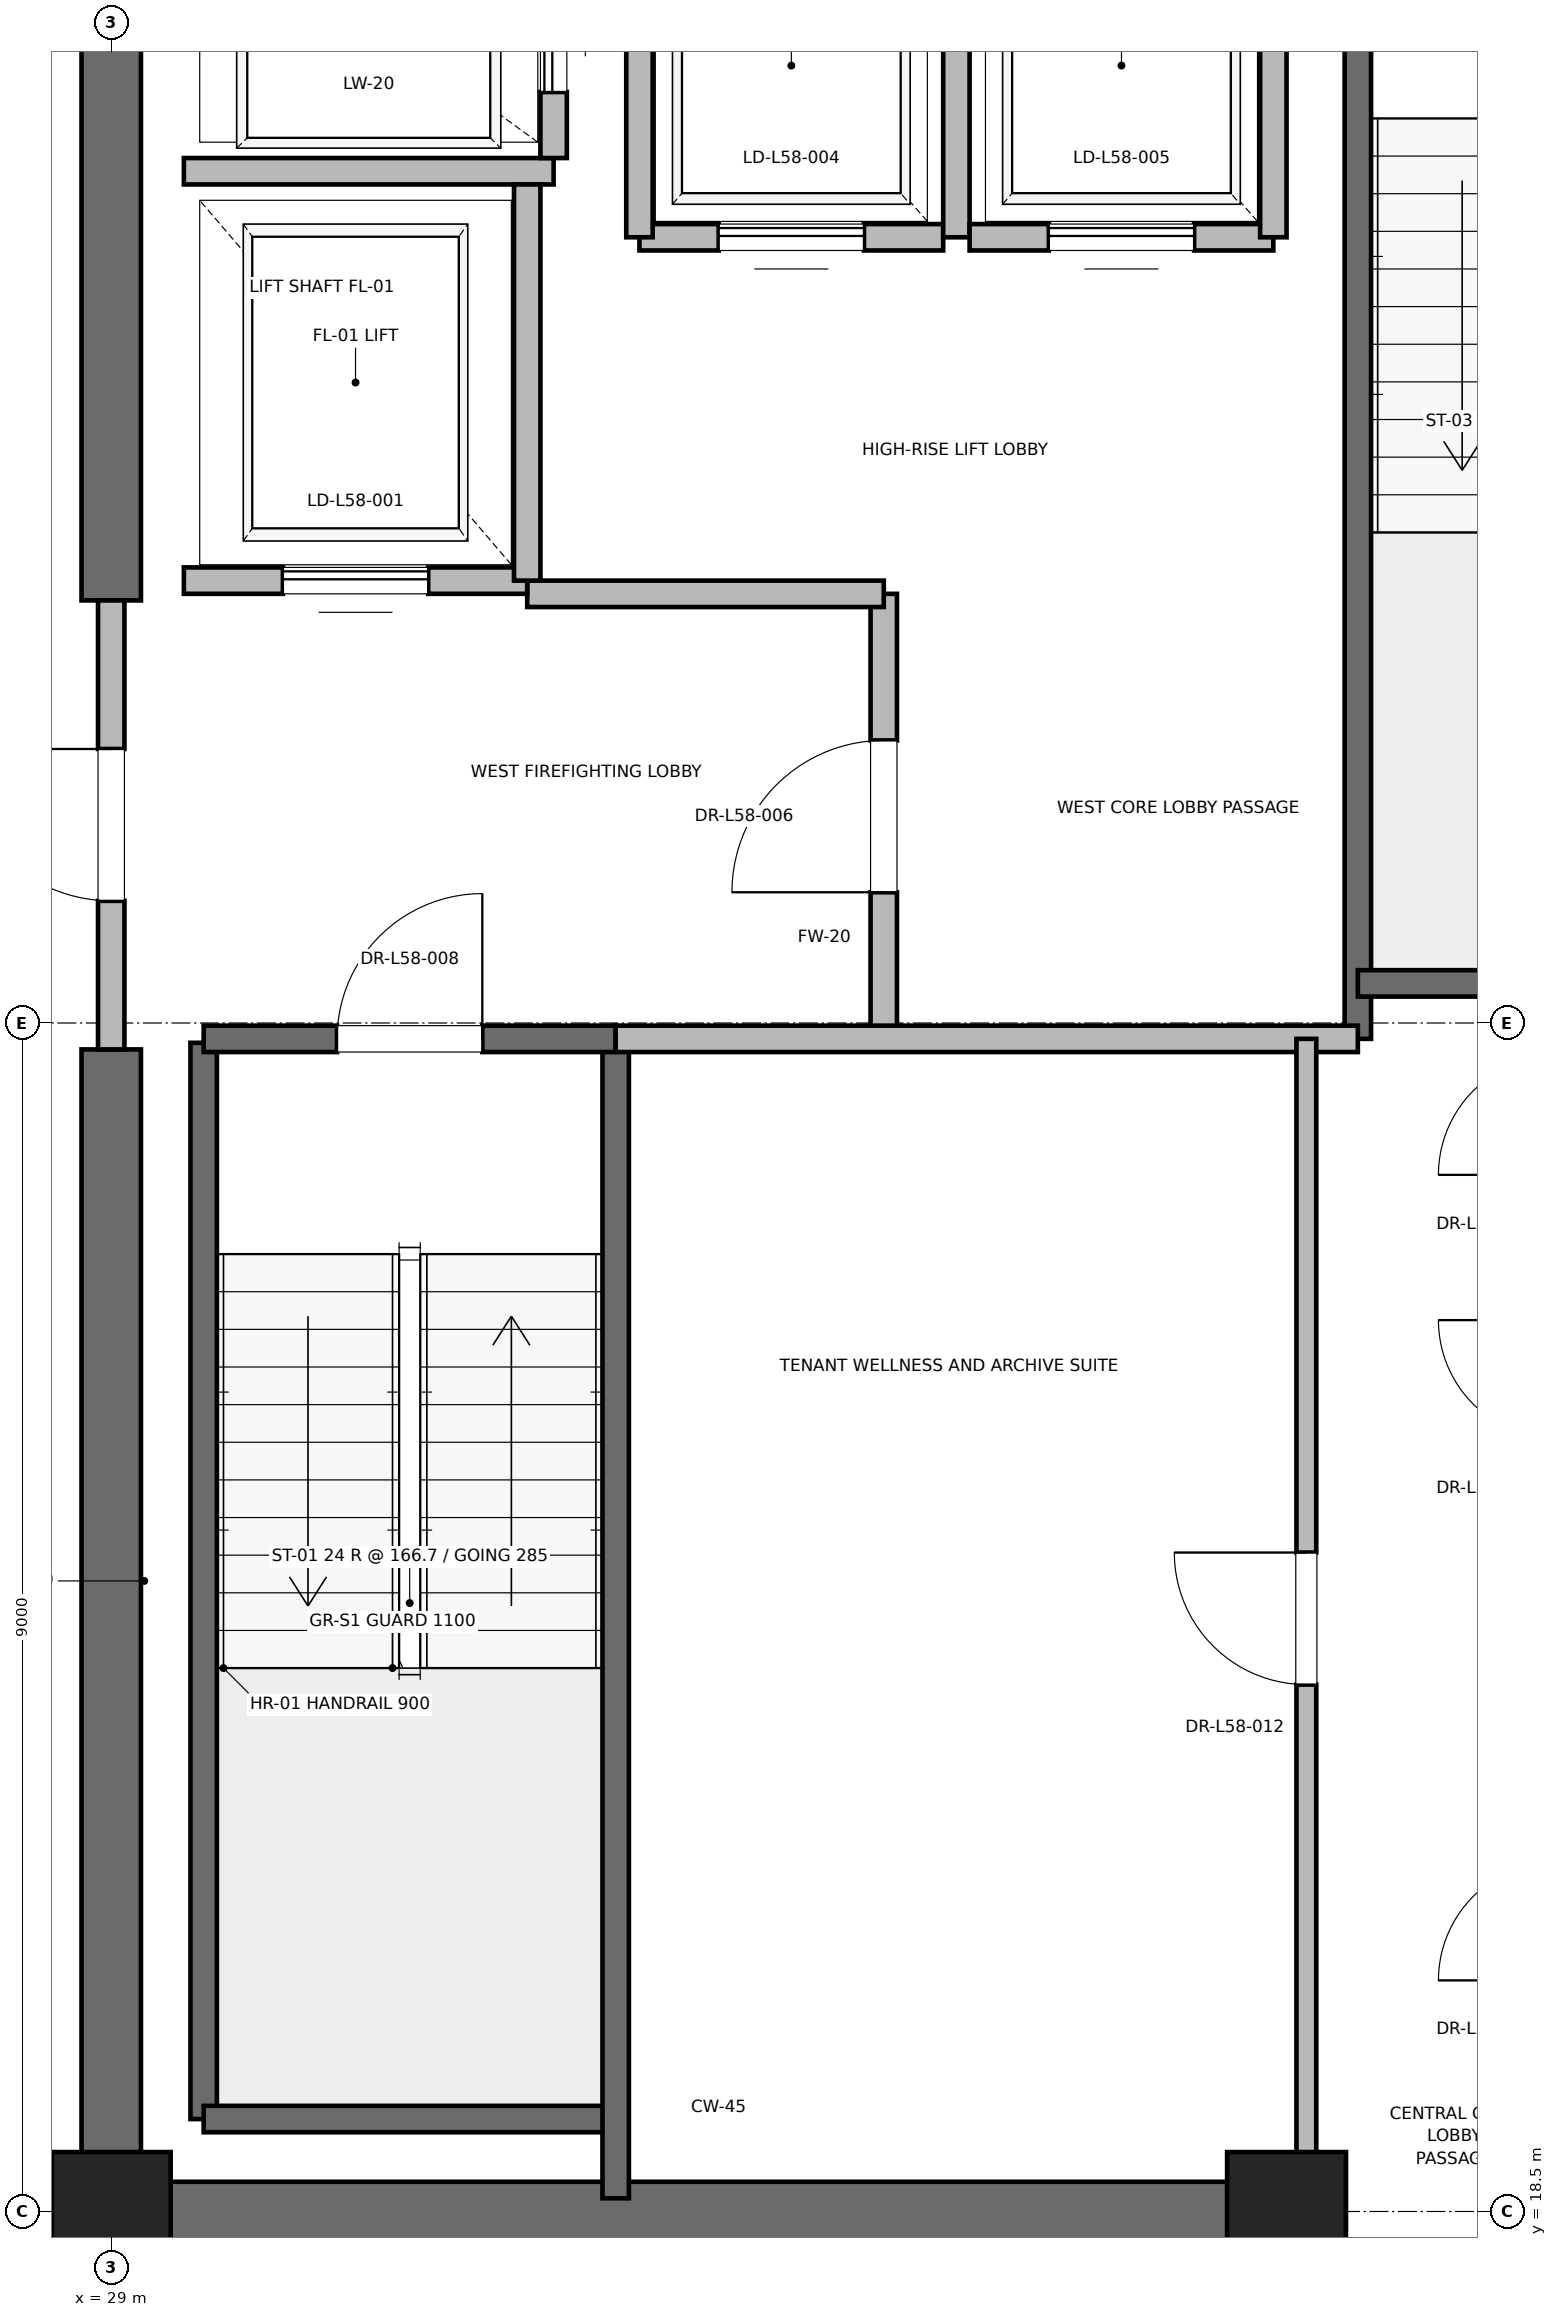
"""IFC4 building model, lengths in metres.
Left out: names, types, materials, properties, quantities, classifications, styles, units other than length and angle.
Written with IfcOpenShell. Run it as: python <this file> out.ifc"""

import sys

from ifc_helpers import new_model, si_unit, direction, frame, frame_2d, origin, origin_2d, place, context, subcontext, project, spatial, rectangle, extrude, element, fill, save


model = new_model("IFC4")
c1 = context("Model", 3, precision=1e-05, world=origin(), true_north=direction((0.0, 1.0)))
c2 = subcontext(c1, "Body", "Model", "MODEL_VIEW")
j1 = project(units=[si_unit("LENGTHUNIT", "METRE"), si_unit("PLANEANGLEUNIT", "RADIAN")], contexts=[c1])
p1 = place(None, origin())
s1 = spatial("IfcSite", under=j1, at=p1, CompositionType="ELEMENT")
p2 = place(p1, origin())
s2 = spatial("IfcBuilding", under=s1, at=p2, CompositionType="ELEMENT")
p3 = place(p2, frame((0.0, 0.0, 251.2)))
s3 = spatial("IfcBuildingStorey", under=s2, at=p3, CompositionType="ELEMENT", Elevation=251.2)
for number, where, z_axis, x_axis in (
    (1, (29.0, 18.5, 0.0), (0.0, 0.0, 1.0), (1.0, 0.0, 0.0)),
    (2, (37.9, 18.5, 0.0), (0.0, 0.0, 1.0), (1.0, 0.0, 0.0)),
):
    element("IfcColumn", number, at=place(p3, frame(where, z_axis=z_axis, x_axis=x_axis)), inside=s3, PredefinedType="PILASTER", context=c2, shape_type="SweptSolid", body=[
        extrude(rectangle(XDim=0.9, YDim=0.9, at=origin_2d()), origin(), (0.0, 0.0, 1.0), 4.0),
    ])
p4 = place(p3, frame((29.0, 18.5, 0.0), z_axis=(0.0, 0.0, 1.0), x_axis=(1.0, 0.0, 0.0)))
e3 = element("IfcWall", 3, at=p4, inside=s3, PredefinedType="SHEAR", context=c2, shape_type="SweptSolid", body=[
    extrude(rectangle(XDim=9.2, YDim=0.45, at=frame_2d((4.6, 0.0))), origin(), (0.0, 0.0, 1.0), 3.785),
])
p5 = place(p3, frame((29.0, 18.5, 0.0), z_axis=(0.0, 0.0, 1.0), x_axis=(0.0, 1.0, 0.0)))
e4 = element("IfcWall", 4, at=p5, inside=s3, PredefinedType="SHEAR", context=c2, shape_type="SweptSolid", body=[
    extrude(rectangle(XDim=8.8, YDim=0.45, at=frame_2d((4.4, 0.0))), origin(), (0.0, 0.0, 1.0), 3.785),
])
p6 = place(p3, frame((29.0, 30.7, 0.0), z_axis=(0.0, 0.0, 1.0), x_axis=(0.0, 1.0, 0.0)))
e5 = element("IfcWall", 5, at=p6, inside=s3, PredefinedType="SHEAR", context=c2, shape_type="SweptSolid", body=[
    extrude(rectangle(XDim=5.8, YDim=0.45, at=frame_2d((2.9, 0.0))), origin(), (0.0, 0.0, 1.0), 3.785),
])
p7 = place(p3, frame((29.7, 19.2, 0.0), z_axis=(0.0, 0.0, 1.0), x_axis=(0.0, 1.0, 0.0)))
e6 = element("IfcWall", 6, at=p7, inside=s3, PredefinedType="SOLIDWALL", context=c2, shape_type="SweptSolid", body=[
    extrude(rectangle(XDim=8.15, YDim=0.2, at=frame_2d((4.075, 0.0))), origin(), (0.0, 0.0, 1.0), 3.785),
])
p8 = place(p3, frame((29.7, 19.2, 0.0), z_axis=(0.0, 0.0, 1.0), x_axis=(1.0, 0.0, 0.0)))
e7 = element("IfcWall", 7, at=p8, inside=s3, PredefinedType="SOLIDWALL", context=c2, shape_type="SweptSolid", body=[
    extrude(rectangle(XDim=3.12, YDim=0.2, at=frame_2d((1.56, 0.0))), origin(), (0.0, 0.0, 1.0), 3.785),
])
p9 = place(p3, frame((32.82, 18.6, 0.0), z_axis=(0.0, 0.0, 1.0), x_axis=(0.0, 1.0, 0.0)))
e8 = element("IfcWall", 8, at=p9, inside=s3, PredefinedType="SOLIDWALL", context=c2, shape_type="SweptSolid", body=[
    extrude(rectangle(XDim=8.78, YDim=0.2, at=frame_2d((4.39, 0.0))), origin(), (0.0, 0.0, 1.0), 3.785),
])
p10 = place(p3, frame((29.7, 27.38, 0.0), z_axis=(0.0, 0.0, 1.0), x_axis=(1.0, 0.0, 0.0)))
e9 = element("IfcWall", 9, at=p10, inside=s3, PredefinedType="SOLIDWALL", context=c2, shape_type="SweptSolid", body=[
    extrude(rectangle(XDim=3.12, YDim=0.2, at=frame_2d((1.56, 0.0))), origin(), (0.0, 0.0, 1.0), 3.785),
])
p11 = place(p10, frame((1.01, 0.0, 0.0)))
e10 = element("IfcOpeningElement", 10, at=p11, cuts=e9, PredefinedType="OPENING", context=c2, shape_type="SweptSolid", body=[
    extrude(rectangle(XDim=1.1, YDim=2.15, at=frame_2d((0.55, 1.075))), frame((0.0, 0.1, 0.0), z_axis=(0.0, -1.0, 0.0), x_axis=(1.0, 0.0, 0.0)), (0.0, 0.0, 1.0), 0.2),
])
p12 = place(p3, frame((38.44, 27.38, 0.0), z_axis=(0.0, 0.0, 1.0), x_axis=(0.0, 1.0, 0.0)))
e11 = element("IfcWall", 11, at=p12, inside=s3, PredefinedType="SOLIDWALL", context=c2, shape_type="SweptSolid", body=[
    extrude(rectangle(XDim=8.87, YDim=0.2, at=frame_2d((4.435, 0.0))), origin(), (0.0, 0.0, 1.0), 3.785),
])
p13 = place(p3, frame((38.44, 27.8, 0.0), z_axis=(0.0, 0.0, 1.0), x_axis=(1.0, 0.0, 0.0)))
e12 = element("IfcWall", 12, at=p13, inside=s3, PredefinedType="SOLIDWALL", context=c2, shape_type="SweptSolid", body=[
    extrude(rectangle(XDim=3.32, YDim=0.2, at=frame_2d((1.66, 0.0))), origin(), (0.0, 0.0, 1.0), 3.785),
])
p14 = place(p3, frame((34.85, 27.38, 0.0), z_axis=(0.0, 0.0, 1.0), x_axis=(0.0, 1.0, 0.0)))
e13 = element("IfcWall", 13, at=p14, inside=s3, PredefinedType="PARTITIONING", context=c2, shape_type="SweptSolid", body=[
    extrude(rectangle(XDim=3.37, YDim=0.2, at=frame_2d((1.685, 0.0))), origin(), (0.0, 0.0, 1.0), 3.785),
])
p15 = place(p14, frame((1.11, 0.0, 0.0)))
e14 = element("IfcOpeningElement", 14, at=p15, cuts=e13, PredefinedType="OPENING", context=c2, shape_type="SweptSolid", body=[
    extrude(rectangle(XDim=1.15, YDim=2.2, at=frame_2d((0.575, 1.1))), frame((0.0, 0.1, 0.0), z_axis=(0.0, -1.0, 0.0), x_axis=(1.0, 0.0, 0.0)), (0.0, 0.0, 1.0), 0.2),
])
p16 = place(p3, frame((29.0, 27.3, 0.0), z_axis=(0.0, 0.0, 1.0), x_axis=(0.0, 1.0, 0.0)))
e15 = element("IfcWall", 15, at=p16, inside=s3, PredefinedType="PARTITIONING", context=c2, shape_type="SweptSolid", body=[
    extrude(rectangle(XDim=3.4, YDim=0.2, at=frame_2d((1.7, 0.0))), origin(), (0.0, 0.0, 1.0), 2.865),
])
p17 = place(p16, frame((1.125, 0.0, 0.0)))
e16 = element("IfcOpeningElement", 16, at=p17, cuts=e15, PredefinedType="OPENING", context=c2, shape_type="SweptSolid", body=[
    extrude(rectangle(XDim=1.15, YDim=2.2, at=frame_2d((0.575, 1.1))), frame((0.0, 0.1, 0.0), z_axis=(0.0, -1.0, 0.0), x_axis=(1.0, 0.0, 0.0)), (0.0, 0.0, 1.0), 0.2),
])
p18 = place(p3, frame((32.82, 27.38, 0.0), z_axis=(0.0, 0.0, 1.0), x_axis=(1.0, 0.0, 0.0)))
e17 = element("IfcWall", 17, at=p18, inside=s3, PredefinedType="PARTITIONING", context=c2, shape_type="SweptSolid", body=[
    extrude(rectangle(XDim=5.62, YDim=0.2, at=frame_2d((2.81, 0.0))), origin(), (0.0, 0.0, 1.0), 3.785),
])
p19 = place(p3, frame((32.15, 30.75, 0.0), z_axis=(0.0, 0.0, 1.0), x_axis=(1.0, 0.0, 0.0)))
e18 = element("IfcWall", 18, at=p19, inside=s3, PredefinedType="PARTITIONING", context=c2, shape_type="SweptSolid", body=[
    extrude(rectangle(XDim=2.7, YDim=0.2, at=frame_2d((1.35, 0.0))), origin(), (0.0, 0.0, 1.0), 3.785),
])
p20 = place(p3, frame((29.55, 30.85, 0.0), z_axis=(0.0, 0.0, 1.0), x_axis=(1.0, 0.0, 0.0)))
e19 = element("IfcWall", 19, at=p20, inside=s3, PredefinedType="SOLIDWALL", context=c2, shape_type="SweptSolid", body=[
    extrude(rectangle(XDim=2.6, YDim=0.2, at=frame_2d((1.3, 0.0))), origin(), (0.0, 0.0, 1.0), 2.865),
])
p21 = place(p20, frame((0.75, 0.0, 0.0)))
e20 = element("IfcOpeningElement", 20, at=p21, cuts=e19, PredefinedType="OPENING", context=c2, shape_type="SweptSolid", body=[
    extrude(rectangle(XDim=1.1, YDim=2.2, at=frame_2d((0.55, 1.1))), frame((0.0, 0.1, 0.0), z_axis=(0.0, -1.0, 0.0), x_axis=(1.0, 0.0, 0.0)), (0.0, 0.0, 1.0), 0.2),
])
p22 = place(p3, frame((29.55, 33.95, 0.0), z_axis=(0.0, 0.0, 1.0), x_axis=(1.0, 0.0, 0.0)))
e21 = element("IfcWall", 21, at=p22, inside=s3, PredefinedType="SOLIDWALL", context=c2, shape_type="SweptSolid", body=[
    extrude(rectangle(XDim=2.8, YDim=0.2, at=frame_2d((1.4, 0.0))), origin(), (0.0, 0.0, 1.0), 3.785),
])
p23 = place(p3, frame((32.15, 30.85, 0.0), z_axis=(0.0, 0.0, 1.0), x_axis=(0.0, 1.0, 0.0)))
e22 = element("IfcWall", 22, at=p23, inside=s3, PredefinedType="SOLIDWALL", context=c2, shape_type="SweptSolid", body=[
    extrude(rectangle(XDim=3.0, YDim=0.2, at=frame_2d((1.5, 0.0))), origin(), (0.0, 0.0, 1.0), 3.785),
])
p24 = place(p3, frame((32.35, 34.05, 0.0), z_axis=(0.0, 0.0, 1.0), x_axis=(0.0, 1.0, 0.0)))
e23 = element("IfcWall", 23, at=p24, inside=s3, PredefinedType="SOLIDWALL", context=c2, shape_type="SweptSolid", body=[
    extrude(rectangle(XDim=2.1, YDim=0.2, at=frame_2d((1.05, 0.0))), origin(), (0.0, 0.0, 1.0), 3.785),
])
p25 = place(p24, frame((0.5, 0.0, 0.0)))
e24 = element("IfcOpeningElement", 24, at=p25, cuts=e23, PredefinedType="OPENING", context=c2, shape_type="SweptSolid", body=[
    extrude(rectangle(XDim=1.1, YDim=2.2, at=frame_2d((0.55, 1.1))), frame((0.0, 0.1, 0.0), z_axis=(0.0, -1.0, 0.0), x_axis=(1.0, 0.0, 0.0)), (0.0, 0.0, 1.0), 0.2),
])
p26 = place(p3, frame((33.0, 33.45, 0.0), z_axis=(0.0, 0.0, 1.0), x_axis=(1.0, 0.0, 0.0)))
e25 = element("IfcWall", 25, at=p26, inside=s3, PredefinedType="SOLIDWALL", context=c2, shape_type="SweptSolid", body=[
    extrude(rectangle(XDim=2.3, YDim=0.2, at=frame_2d((1.15, 0.0))), origin(), (0.0, 0.0, 1.0), 3.785),
])
p27 = place(p26, frame((0.6, 0.0, 0.0)))
e26 = element("IfcOpeningElement", 26, at=p27, cuts=e25, PredefinedType="OPENING", context=c2, shape_type="SweptSolid", body=[
    extrude(rectangle(XDim=1.1, YDim=2.2, at=frame_2d((0.55, 1.1))), frame((0.0, 0.1, 0.0), z_axis=(0.0, -1.0, 0.0), x_axis=(1.0, 0.0, 0.0)), (0.0, 0.0, 1.0), 0.2),
])
p28 = place(p3, frame((33.0, 36.05, 0.0), z_axis=(0.0, 0.0, 1.0), x_axis=(0.0, -1.0, 0.0)))
e27 = element("IfcWall", 27, at=p28, inside=s3, PredefinedType="SOLIDWALL", context=c2, shape_type="SweptSolid", body=[
    extrude(rectangle(XDim=2.6, YDim=0.2, at=frame_2d((1.3, 0.0))), origin(), (0.0, 0.0, 1.0), 3.785),
])
p29 = place(p3, frame((35.4, 33.45, 0.0), z_axis=(0.0, 0.0, 1.0), x_axis=(0.0, 1.0, 0.0)))
e28 = element("IfcWall", 28, at=p29, inside=s3, PredefinedType="SOLIDWALL", context=c2, shape_type="SweptSolid", body=[
    extrude(rectangle(XDim=2.6, YDim=0.2, at=frame_2d((1.3, 0.0))), origin(), (0.0, 0.0, 1.0), 2.865),
])
p30 = place(p3, frame((35.5, 33.45, 0.0), z_axis=(0.0, 0.0, 1.0), x_axis=(1.0, 0.0, 0.0)))
e29 = element("IfcWall", 29, at=p30, inside=s3, PredefinedType="SOLIDWALL", context=c2, shape_type="SweptSolid", body=[
    extrude(rectangle(XDim=2.3, YDim=0.2, at=frame_2d((1.15, 0.0))), origin(), (0.0, 0.0, 1.0), 3.785),
])
p31 = place(p30, frame((0.6, 0.0, 0.0)))
e30 = element("IfcOpeningElement", 30, at=p31, cuts=e29, PredefinedType="OPENING", context=c2, shape_type="SweptSolid", body=[
    extrude(rectangle(XDim=1.1, YDim=2.2, at=frame_2d((0.55, 1.1))), frame((0.0, 0.1, 0.0), z_axis=(0.0, -1.0, 0.0), x_axis=(1.0, 0.0, 0.0)), (0.0, 0.0, 1.0), 0.2),
])
p32 = place(p3, frame((37.8, 33.45, 0.0), z_axis=(0.0, 0.0, 1.0), x_axis=(0.0, 1.0, 0.0)))
e31 = element("IfcWall", 31, at=p32, inside=s3, PredefinedType="SOLIDWALL", context=c2, shape_type="SweptSolid", body=[
    extrude(rectangle(XDim=2.6, YDim=0.2, at=frame_2d((1.3, 0.0))), origin(), (0.0, 0.0, 1.0), 2.865),
])
p33 = place(p3, frame((38.05, 18.6, 0.0), z_axis=(0.0, 0.0, 1.0), x_axis=(0.0, 1.0, 0.0)))
e32 = element("IfcWall", 32, at=p33, inside=s3, PredefinedType="PARTITIONING", context=c2, shape_type="SweptSolid", body=[
    extrude(rectangle(XDim=8.78, YDim=0.15, at=frame_2d((4.39, 0.0))), origin(), (0.0, 0.0, 1.0), 2.85),
])
p34 = place(p33, frame((3.89, 0.0, 0.0)))
e33 = element("IfcOpeningElement", 33, at=p34, cuts=e32, PredefinedType="OPENING", context=c2, shape_type="SweptSolid", body=[
    extrude(rectangle(XDim=1.0, YDim=2.15, at=frame_2d((0.5, 1.075))), frame((0.0, 0.075, 0.0), z_axis=(0.0, -1.0, 0.0), x_axis=(1.0, 0.0, 0.0)), (0.0, 0.0, 1.0), 0.15),
])
p35 = place(p11, origin())
e34 = element("IfcDoor", 34, at=p35, inside=s3, OperationType="SINGLE_SWING_RIGHT", PredefinedType="DOOR", context=c2, shape_type="SweptSolid", body=[
    extrude(rectangle(XDim=1.1, YDim=2.15, at=frame_2d((0.55, 1.075))), frame((0.0, 0.025, 0.0), z_axis=(0.0, -1.0, 0.0), x_axis=(1.0, 0.0, 0.0)), (0.0, 0.0, 1.0), 0.05),
])
fill(e10, e34)
p36 = place(p15, origin())
e35 = element("IfcDoor", 35, at=p36, inside=s3, OperationType="SINGLE_SWING_LEFT", PredefinedType="DOOR", context=c2, shape_type="SweptSolid", body=[
    extrude(rectangle(XDim=1.15, YDim=2.2, at=frame_2d((0.575, 1.1))), frame((0.0, 0.025, 0.0), z_axis=(0.0, -1.0, 0.0), x_axis=(1.0, 0.0, 0.0)), (0.0, 0.0, 1.0), 0.05),
])
fill(e14, e35)
p37 = place(p17, origin())
e36 = element("IfcDoor", 36, at=p37, inside=s3, OperationType="SINGLE_SWING_RIGHT", PredefinedType="DOOR", context=c2, shape_type="SweptSolid", body=[
    extrude(rectangle(XDim=1.15, YDim=2.2, at=frame_2d((0.575, 1.1))), frame((0.0, 0.025, 0.0), z_axis=(0.0, -1.0, 0.0), x_axis=(1.0, 0.0, 0.0)), (0.0, 0.0, 1.0), 0.05),
])
fill(e16, e36)
p38 = place(p21, origin())
e37 = element("IfcDoor", 37, at=p38, inside=s3, OperationType="SLIDING_TO_RIGHT", PredefinedType="DOOR", context=c2, shape_type="SweptSolid", body=[
    extrude(rectangle(XDim=1.1, YDim=2.2, at=frame_2d((0.55, 1.1))), frame((0.0, 0.025, 0.0), z_axis=(0.0, -1.0, 0.0), x_axis=(1.0, 0.0, 0.0)), (0.0, 0.0, 1.0), 0.05),
])
fill(e20, e37)
p39 = place(p25, origin())
e38 = element("IfcDoor", 38, at=p39, inside=s3, OperationType="SLIDING_TO_RIGHT", PredefinedType="DOOR", context=c2, shape_type="SweptSolid", body=[
    extrude(rectangle(XDim=1.1, YDim=2.2, at=frame_2d((0.55, 1.1))), frame((0.0, 0.025, 0.0), z_axis=(0.0, -1.0, 0.0), x_axis=(1.0, 0.0, 0.0)), (0.0, 0.0, 1.0), 0.05),
])
fill(e24, e38)
p40 = place(p27, origin())
e39 = element("IfcDoor", 39, at=p40, inside=s3, OperationType="SLIDING_TO_RIGHT", PredefinedType="DOOR", context=c2, shape_type="SweptSolid", body=[
    extrude(rectangle(XDim=1.1, YDim=2.2, at=frame_2d((0.55, 1.1))), frame((0.0, 0.025, 0.0), z_axis=(0.0, -1.0, 0.0), x_axis=(1.0, 0.0, 0.0)), (0.0, 0.0, 1.0), 0.05),
])
fill(e26, e39)
p41 = place(p31, origin())
e40 = element("IfcDoor", 40, at=p41, inside=s3, OperationType="SLIDING_TO_RIGHT", PredefinedType="DOOR", context=c2, shape_type="SweptSolid", body=[
    extrude(rectangle(XDim=1.1, YDim=2.2, at=frame_2d((0.55, 1.1))), frame((0.0, 0.025, 0.0), z_axis=(0.0, -1.0, 0.0), x_axis=(1.0, 0.0, 0.0)), (0.0, 0.0, 1.0), 0.05),
])
fill(e30, e40)
p42 = place(p34, origin())
e41 = element("IfcDoor", 41, at=p42, inside=s3, OperationType="SINGLE_SWING_RIGHT", PredefinedType="DOOR", context=c2, shape_type="SweptSolid", body=[
    extrude(rectangle(XDim=1.0, YDim=2.15, at=frame_2d((0.5, 1.075))), frame((0.0, 0.025, 0.0), z_axis=(0.0, -1.0, 0.0), x_axis=(1.0, 0.0, 0.0)), (0.0, 0.0, 1.0), 0.05),
])
fill(e33, e41)
save(model, sys.argv[1])
